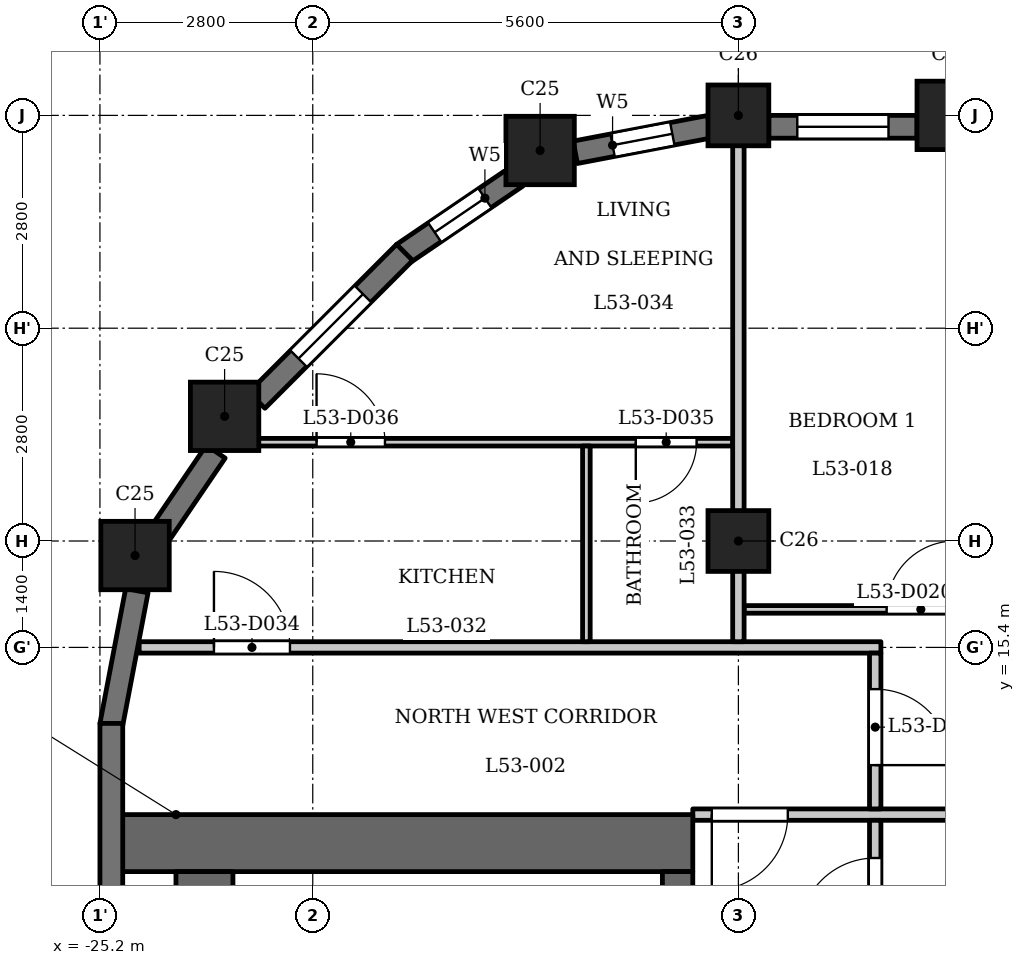
"""IFC4 building model, lengths in metres.
Left out: names, types, materials, properties, quantities, classifications, styles, units other than length and angle.
Written with IfcOpenShell. Run it as: python <this file> out.ifc"""

import sys

from ifc_helpers import new_model, si_unit, direction, frame, frame_2d, origin, origin_2d, place, context, subcontext, project, spatial, rectangle, extrude, element, fill, save


model = new_model("IFC4")
c1 = context("Model", 3, precision=1e-05, world=origin(), true_north=direction((0.0, 1.0)))
c2 = subcontext(c1, "Body", "Model", "MODEL_VIEW")
j1 = project(units=[si_unit("LENGTHUNIT", "METRE"), si_unit("PLANEANGLEUNIT", "RADIAN")], contexts=[c1])
p1 = place(None, origin())
s1 = spatial("IfcSite", under=j1, at=p1, CompositionType="ELEMENT")
p2 = place(p1, origin())
s2 = spatial("IfcBuilding", under=s1, at=p2, CompositionType="ELEMENT")
p3 = place(p2, frame((0.0, 0.0, 206.4)))
s3 = spatial("IfcBuildingStorey", under=s2, at=p3, CompositionType="ELEMENT", Elevation=206.4)
for number, where, z_axis, x_axis in (
    (1, (-14.0, 22.4, 0.0), (0.0, 0.0, 1.0), (1.0, 0.0, 0.0)),
    (2, (-19.409, 21.938, 0.0), (0.0, 0.0, 1.0), (1.0, 0.0, 0.0)),
    (3, (-23.56, 18.44, 0.0), (0.0, 0.0, 1.0), (1.0, 0.0, 0.0)),
    (4, (-24.738, 16.609, 0.0), (0.0, 0.0, 1.0), (1.0, 0.0, 0.0)),
):
    element("IfcColumn", number, at=place(p3, frame(where, z_axis=z_axis, x_axis=x_axis)), inside=s3, PredefinedType="COLUMN", context=c2, shape_type="SweptSolid", body=[
        extrude(rectangle(XDim=0.9, YDim=0.9, at=origin_2d()), origin(), (0.0, 0.0, 1.0), 3.5),
    ])
for number, where, z_axis, x_axis in (
    (5, (-16.8, 16.8, 0.0), (0.0, 0.0, 1.0), (1.0, 0.0, 0.0)),
    (6, (-16.8, 22.4, 0.0), (0.0, 0.0, 1.0), (1.0, 0.0, 0.0)),
):
    element("IfcColumn", number, at=place(p3, frame(where, z_axis=z_axis, x_axis=x_axis)), inside=s3, PredefinedType="COLUMN", context=c2, shape_type="SweptSolid", body=[
        extrude(rectangle(XDim=0.8, YDim=0.8, at=origin_2d()), origin(), (0.0, 0.0, 1.0), 3.5),
    ])
p4 = place(p3, frame((-14.45, 22.25, 0.0), z_axis=(0.0, 0.0, 1.0), x_axis=(-1.0, 0.0, 0.0)))
e7 = element("IfcWall", 7, at=p4, inside=s3, PredefinedType="SOLIDWALL", context=c2, shape_type="SweptSolid", body=[
    extrude(rectangle(XDim=1.95, YDim=0.3, at=frame_2d((0.975, 0.0))), origin(), (0.0, 0.0, 1.0), 2.5),
])
p5 = place(p4, frame((0.375, 0.0, 0.6)))
e8 = element("IfcOpeningElement", 8, at=p5, cuts=e7, PredefinedType="OPENING", context=c2, shape_type="SweptSolid", body=[
    extrude(rectangle(XDim=1.2, YDim=1.55, at=frame_2d((0.6, 0.775))), frame((0.0, 0.16, 0.0), z_axis=(0.0, -1.0, 0.0), x_axis=(1.0, 0.0, 0.0)), (0.0, 0.0, 1.0), 0.32),
])
p6 = place(p3, frame((-17.179, 22.251, 0.0), z_axis=(0.0, 0.0, 1.0), x_axis=(-0.98230529033, -0.187286722942, 0.0)))
e9 = element("IfcWall", 9, at=p6, inside=s3, PredefinedType="SOLIDWALL", context=c2, shape_type="SweptSolid", body=[
    extrude(rectangle(XDim=1.799, YDim=0.3, at=frame_2d((0.899, 0.0))), origin(), (0.0, 0.0, 1.0), 2.5),
])
p7 = place(p6, frame((0.5, 0.0, 0.6)))
e10 = element("IfcOpeningElement", 10, at=p7, cuts=e9, PredefinedType="OPENING", context=c2, shape_type="SweptSolid", body=[
    extrude(rectangle(XDim=0.8, YDim=1.55, at=frame_2d((0.4, 0.775))), frame((0.0, 0.16, 0.0), z_axis=(0.0, -1.0, 0.0), x_axis=(1.0, 0.0, 0.0)), (0.0, 0.0, 1.0), 0.32),
])
p8 = place(p3, frame((-19.719, 21.594, 0.0), z_axis=(0.0, 0.0, 1.0), x_axis=(-0.827067282455, -0.562102935673, 0.0)))
e11 = element("IfcWall", 11, at=p8, inside=s3, PredefinedType="SOLIDWALL", context=c2, shape_type="SweptSolid", body=[
    extrude(rectangle(XDim=1.806, YDim=0.3, at=frame_2d((0.903, 0.0))), origin(), (0.0, 0.0, 1.0), 2.5),
])
p9 = place(p8, frame((0.503, 0.0, 0.6)))
e12 = element("IfcOpeningElement", 12, at=p9, cuts=e11, PredefinedType="OPENING", context=c2, shape_type="SweptSolid", body=[
    extrude(rectangle(XDim=0.8, YDim=1.55, at=frame_2d((0.4, 0.775))), frame((0.0, 0.16, 0.0), z_axis=(0.0, -1.0, 0.0), x_axis=(1.0, 0.0, 0.0)), (0.0, 0.0, 1.0), 0.32),
])
p10 = place(p3, frame((-21.191, 20.597, 0.0), z_axis=(0.0, 0.0, 1.0), x_axis=(-0.707106781187, -0.707106781187, 0.0)))
e13 = element("IfcWall", 13, at=p10, inside=s3, PredefinedType="SOLIDWALL", context=c2, shape_type="SweptSolid", body=[
    extrude(rectangle(XDim=2.75, YDim=0.3, at=frame_2d((1.375, 0.0))), origin(), (0.0, 0.0, 1.0), 2.5),
])
p11 = place(p10, frame((0.775, 0.0, 0.6)))
e14 = element("IfcOpeningElement", 14, at=p11, cuts=e13, PredefinedType="OPENING", context=c2, shape_type="SweptSolid", body=[
    extrude(rectangle(XDim=1.2, YDim=1.55, at=frame_2d((0.6, 0.775))), frame((0.0, 0.16, 0.0), z_axis=(0.0, -1.0, 0.0), x_axis=(1.0, 0.0, 0.0)), (0.0, 0.0, 1.0), 0.32),
])
p12 = place(p3, frame((-23.676, 17.975, 0.0), z_axis=(0.0, 0.0, 1.0), x_axis=(-0.56200149592, -0.827136215253, 0.0)))
e15 = element("IfcWall", 15, at=p12, inside=s3, PredefinedType="SOLIDWALL", context=c2, shape_type="SweptSolid", body=[
    extrude(rectangle(XDim=1.277, YDim=0.3, at=frame_2d((0.639, 0.0))), origin(), (0.0, 0.0, 1.0), 2.5),
])
p13 = place(p3, frame((-24.714, 16.146, 0.0), z_axis=(0.0, 0.0, 1.0), x_axis=(-0.187348135549, -0.982293579388, 0.0)))
e16 = element("IfcWall", 16, at=p13, inside=s3, PredefinedType="SOLIDWALL", context=c2, shape_type="SweptSolid", body=[
    extrude(rectangle(XDim=1.806, YDim=0.3, at=frame_2d((0.903, 0.0))), origin(), (0.0, 0.0, 1.0), 2.5),
])
p14 = place(p3, frame((-25.05, 14.4, 0.0), z_axis=(0.0, 0.0, 1.0), x_axis=(0.0, -1.0, 0.0)))
e17 = element("IfcWall", 17, at=p14, inside=s3, PredefinedType="SOLIDWALL", context=c2, shape_type="SweptSolid", body=[
    extrude(rectangle(XDim=2.75, YDim=0.3, at=frame_2d((1.375, 0.0))), origin(), (0.0, 0.0, 1.0), 2.5),
])
p15 = place(p3, frame((-17.4, 12.825, 0.0), z_axis=(0.0, 0.0, 1.0), x_axis=(-1.0, 0.0, 0.0)))
e18 = element("IfcWall", 18, at=p15, inside=s3, PredefinedType="SHEAR", context=c2, shape_type="SweptSolid", body=[
    extrude(rectangle(XDim=7.6, YDim=0.75, at=frame_2d((3.8, 0.0))), origin(), (0.0, 0.0, 1.0), 3.2),
])
p16 = place(p3, frame((-17.6, -12.45, 0.0), z_axis=(0.0, 0.0, 1.0), x_axis=(0.0, 1.0, 0.0)))
e19 = element("IfcWall", 19, at=p16, inside=s3, PredefinedType="SHEAR", context=c2, shape_type="SweptSolid", body=[
    extrude(rectangle(XDim=24.9, YDim=0.4, at=frame_2d((12.45, 0.0))), origin(), (0.0, 0.0, 1.0), 3.2),
])
p17 = place(p16, frame((8.65, 0.0, 0.0)))
e20 = element("IfcOpeningElement", 20, at=p17, cuts=e19, PredefinedType="OPENING", context=c2, shape_type="SweptSolid", body=[
    extrude(rectangle(XDim=0.9, YDim=2.1, at=frame_2d((0.45, 1.05))), frame((0.0, 0.21, 0.0), z_axis=(0.0, -1.0, 0.0), x_axis=(1.0, 0.0, 0.0)), (0.0, 0.0, 1.0), 0.42),
])
p18 = place(p16, frame((15.6, 0.0, 0.0)))
e21 = element("IfcOpeningElement", 21, at=p18, cuts=e19, PredefinedType="OPENING", context=c2, shape_type="SweptSolid", body=[
    extrude(rectangle(XDim=1.1, YDim=2.1, at=frame_2d((0.55, 1.05))), frame((0.0, 0.21, 0.0), z_axis=(0.0, -1.0, 0.0), x_axis=(1.0, 0.0, 0.0)), (0.0, 0.0, 1.0), 0.42),
])
p19 = place(p16, frame((18.0, 0.0, 0.0)))
e22 = element("IfcOpeningElement", 22, at=p19, cuts=e19, PredefinedType="OPENING", context=c2, shape_type="SweptSolid", body=[
    extrude(rectangle(XDim=1.1, YDim=2.1, at=frame_2d((0.55, 1.05))), frame((0.0, 0.21, 0.0), z_axis=(0.0, -1.0, 0.0), x_axis=(1.0, 0.0, 0.0)), (0.0, 0.0, 1.0), 0.42),
])
p20 = place(p16, frame((23.025, 0.0, 0.0)))
e23 = element("IfcOpeningElement", 23, at=p20, cuts=e19, PredefinedType="OPENING", context=c2, shape_type="SweptSolid", body=[
    extrude(rectangle(XDim=1.1, YDim=2.1, at=frame_2d((0.55, 1.05))), frame((0.0, 0.21, 0.0), z_axis=(0.0, -1.0, 0.0), x_axis=(1.0, 0.0, 0.0)), (0.0, 0.0, 1.0), 0.42),
])
p21 = place(p16, frame((0.775, 0.0, 0.0)))
e24 = element("IfcOpeningElement", 24, at=p21, cuts=e19, PredefinedType="OPENING", context=c2, shape_type="SweptSolid", body=[
    extrude(rectangle(XDim=1.1, YDim=2.1, at=frame_2d((0.55, 1.05))), frame((0.0, 0.21, 0.0), z_axis=(0.0, -1.0, 0.0), x_axis=(1.0, 0.0, 0.0)), (0.0, 0.0, 1.0), 0.42),
])
p22 = place(p16, frame((12.925, 0.0, 0.0)))
e25 = element("IfcOpeningElement", 25, at=p22, cuts=e19, PredefinedType="OPENING", context=c2, shape_type="SweptSolid", body=[
    extrude(rectangle(XDim=1.8, YDim=2.1, at=frame_2d((0.9, 1.05))), frame((0.0, 0.21, 0.0), z_axis=(0.0, -1.0, 0.0), x_axis=(1.0, 0.0, 0.0)), (0.0, 0.0, 1.0), 0.42),
])
p23 = place(p3, frame((-23.825, -12.45, 0.0), z_axis=(0.0, 0.0, 1.0), x_axis=(0.0, 1.0, 0.0)))
e26 = element("IfcWall", 26, at=p23, inside=s3, PredefinedType="SHEAR", context=c2, shape_type="SweptSolid", body=[
    extrude(rectangle(XDim=24.9, YDim=0.75, at=frame_2d((12.45, 0.0))), origin(), (0.0, 0.0, 1.0), 3.2),
])
p24 = place(p3, frame((-17.4, 13.2, 0.0), z_axis=(0.0, 0.0, 1.0), x_axis=(1.0, 0.0, 0.0)))
e27 = element("IfcWall", 27, at=p24, inside=s3, PredefinedType="PARTITIONING", context=c2, shape_type="SweptSolid", body=[
    extrude(rectangle(XDim=34.8, YDim=0.15, at=frame_2d((17.4, 0.0))), origin(), (0.0, 0.0, 1.0), 3.2),
])
p25 = place(p24, frame((0.25, 0.0, 0.0)))
e28 = element("IfcOpeningElement", 28, at=p25, cuts=e27, PredefinedType="OPENING", context=c2, shape_type="SweptSolid", body=[
    extrude(rectangle(XDim=1.0, YDim=2.1, at=frame_2d((0.5, 1.05))), frame((0.0, 0.085, 0.0), z_axis=(0.0, -1.0, 0.0), x_axis=(1.0, 0.0, 0.0)), (0.0, 0.0, 1.0), 0.17),
])
p26 = place(p24, frame((33.65, 0.0, 0.0)))
e29 = element("IfcOpeningElement", 29, at=p26, cuts=e27, PredefinedType="OPENING", context=c2, shape_type="SweptSolid", body=[
    extrude(rectangle(XDim=1.0, YDim=2.1, at=frame_2d((0.5, 1.05))), frame((0.0, 0.085, 0.0), z_axis=(0.0, -1.0, 0.0), x_axis=(1.0, 0.0, 0.0)), (0.0, 0.0, 1.0), 0.17),
])
p27 = place(p3, frame((-24.684, 15.4, 0.0), z_axis=(0.0, 0.0, 1.0), x_axis=(1.0, 0.0, 0.0)))
e30 = element("IfcWall", 30, at=p27, inside=s3, PredefinedType="PARTITIONING", context=c2, shape_type="SweptSolid", body=[
    extrude(rectangle(XDim=9.759, YDim=0.15, at=frame_2d((4.879, 0.0))), origin(), (0.0, 0.0, 1.0), 3.2),
])
p28 = place(p27, frame((0.984, 0.0, 0.0)))
e31 = element("IfcOpeningElement", 31, at=p28, cuts=e30, PredefinedType="OPENING", context=c2, shape_type="SweptSolid", body=[
    extrude(rectangle(XDim=1.0, YDim=2.1, at=frame_2d((0.5, 1.05))), frame((0.0, 0.085, 0.0), z_axis=(0.0, -1.0, 0.0), x_axis=(1.0, 0.0, 0.0)), (0.0, 0.0, 1.0), 0.17),
])
p29 = place(p3, frame((-16.725, 15.9, 0.0), z_axis=(0.0, 0.0, 1.0), x_axis=(1.0, 0.0, 0.0)))
e32 = element("IfcWall", 32, at=p29, inside=s3, PredefinedType="PARTITIONING", context=c2, shape_type="SweptSolid", body=[
    extrude(rectangle(XDim=33.45, YDim=0.1, at=frame_2d((16.725, 0.0))), origin(), (0.0, 0.0, 1.0), 3.2),
])
p30 = place(p29, frame((1.875, 0.0, 0.0)))
e33 = element("IfcOpeningElement", 33, at=p30, cuts=e32, PredefinedType="OPENING", context=c2, shape_type="SweptSolid", body=[
    extrude(rectangle(XDim=0.9, YDim=2.1, at=frame_2d((0.45, 1.05))), frame((0.0, 0.06, 0.0), z_axis=(0.0, -1.0, 0.0), x_axis=(1.0, 0.0, 0.0)), (0.0, 0.0, 1.0), 0.12),
])
p31 = place(p29, frame((3.975, 0.0, 0.0)))
e34 = element("IfcOpeningElement", 34, at=p31, cuts=e32, PredefinedType="OPENING", context=c2, shape_type="SweptSolid", body=[
    extrude(rectangle(XDim=0.9, YDim=2.1, at=frame_2d((0.45, 1.05))), frame((0.0, 0.06, 0.0), z_axis=(0.0, -1.0, 0.0), x_axis=(1.0, 0.0, 0.0)), (0.0, 0.0, 1.0), 0.12),
])
p32 = place(p29, frame((6.825, 0.0, 0.0)))
e35 = element("IfcOpeningElement", 35, at=p32, cuts=e32, PredefinedType="OPENING", context=c2, shape_type="SweptSolid", body=[
    extrude(rectangle(XDim=0.9, YDim=2.1, at=frame_2d((0.45, 1.05))), frame((0.0, 0.06, 0.0), z_axis=(0.0, -1.0, 0.0), x_axis=(1.0, 0.0, 0.0)), (0.0, 0.0, 1.0), 0.12),
])
p33 = place(p29, frame((28.975, 0.0, 0.0)))
e36 = element("IfcOpeningElement", 36, at=p33, cuts=e32, PredefinedType="OPENING", context=c2, shape_type="SweptSolid", body=[
    extrude(rectangle(XDim=0.9, YDim=2.1, at=frame_2d((0.45, 1.05))), frame((0.0, 0.06, 0.0), z_axis=(0.0, -1.0, 0.0), x_axis=(1.0, 0.0, 0.0)), (0.0, 0.0, 1.0), 0.12),
])
p34 = place(p29, frame((30.725, 0.0, 0.0)))
e37 = element("IfcOpeningElement", 37, at=p34, cuts=e32, PredefinedType="OPENING", context=c2, shape_type="SweptSolid", body=[
    extrude(rectangle(XDim=0.9, YDim=2.1, at=frame_2d((0.45, 1.05))), frame((0.0, 0.06, 0.0), z_axis=(0.0, -1.0, 0.0), x_axis=(1.0, 0.0, 0.0)), (0.0, 0.0, 1.0), 0.12),
])
p35 = place(p29, frame((25.625, 0.0, 0.0)))
e38 = element("IfcOpeningElement", 38, at=p35, cuts=e32, PredefinedType="OPENING", context=c2, shape_type="SweptSolid", body=[
    extrude(rectangle(XDim=0.9, YDim=2.1, at=frame_2d((0.45, 1.05))), frame((0.0, 0.06, 0.0), z_axis=(0.0, -1.0, 0.0), x_axis=(1.0, 0.0, 0.0)), (0.0, 0.0, 1.0), 0.12),
])
p36 = place(p3, frame((-23.64, 18.1, 0.0), z_axis=(0.0, 0.0, 1.0), x_axis=(1.0, 0.0, 0.0)))
e39 = element("IfcWall", 39, at=p36, inside=s3, PredefinedType="PARTITIONING", context=c2, shape_type="SweptSolid", body=[
    extrude(rectangle(XDim=6.765, YDim=0.1, at=frame_2d((3.382, 0.0))), origin(), (0.0, 0.0, 1.0), 3.2),
])
p37 = place(p36, frame((5.49, 0.0, 0.0)))
e40 = element("IfcOpeningElement", 40, at=p37, cuts=e39, PredefinedType="OPENING", context=c2, shape_type="SweptSolid", body=[
    extrude(rectangle(XDim=0.8, YDim=2.1, at=frame_2d((0.4, 1.05))), frame((0.0, 0.06, 0.0), z_axis=(0.0, -1.0, 0.0), x_axis=(1.0, 0.0, 0.0)), (0.0, 0.0, 1.0), 0.12),
])
p38 = place(p36, frame((1.29, 0.0, 0.0)))
e41 = element("IfcOpeningElement", 41, at=p38, cuts=e39, PredefinedType="OPENING", context=c2, shape_type="SweptSolid", body=[
    extrude(rectangle(XDim=0.9, YDim=2.1, at=frame_2d((0.45, 1.05))), frame((0.0, 0.06, 0.0), z_axis=(0.0, -1.0, 0.0), x_axis=(1.0, 0.0, 0.0)), (0.0, 0.0, 1.0), 0.12),
])
p39 = place(p3, frame((-18.8, 15.475, 0.0), z_axis=(0.0, 0.0, 1.0), x_axis=(0.0, 1.0, 0.0)))
e42 = element("IfcWall", 42, at=p39, inside=s3, PredefinedType="PARTITIONING", context=c2, shape_type="SweptSolid", body=[
    extrude(rectangle(XDim=2.575, YDim=0.1, at=frame_2d((1.288, 0.0))), origin(), (0.0, 0.0, 1.0), 3.2),
])
p40 = place(p3, frame((-16.8, 15.475, 0.0), z_axis=(0.0, 0.0, 1.0), x_axis=(0.0, 1.0, 0.0)))
e43 = element("IfcWall", 43, at=p40, inside=s3, PredefinedType="PARTITIONING", context=c2, shape_type="SweptSolid", body=[
    extrude(rectangle(XDim=6.835, YDim=0.15, at=frame_2d((3.417, 0.0))), origin(), (0.0, 0.0, 1.0), 2.55),
])
p41 = place(p3, frame((-15.0, 6.769, 0.0), z_axis=(0.0, 0.0, 1.0), x_axis=(0.0, 1.0, 0.0)))
e44 = element("IfcWall", 44, at=p41, inside=s3, PredefinedType="PARTITIONING", context=c2, shape_type="SweptSolid", body=[
    extrude(rectangle(XDim=6.356, YDim=0.15, at=frame_2d((3.178, 0.0))), origin(), (0.0, 0.0, 1.0), 3.2),
])
p42 = place(p41, frame((4.86, 0.0, 0.0)))
e45 = element("IfcOpeningElement", 45, at=p42, cuts=e44, PredefinedType="OPENING", context=c2, shape_type="SweptSolid", body=[
    extrude(rectangle(XDim=1.0, YDim=2.1, at=frame_2d((0.5, 1.05))), frame((0.0, 0.085, 0.0), z_axis=(0.0, -1.0, 0.0), x_axis=(1.0, 0.0, 0.0)), (0.0, 0.0, 1.0), 0.17),
])
p43 = place(p3, frame((-15.0, 13.275, 0.0), z_axis=(0.0, 0.0, 1.0), x_axis=(0.0, 1.0, 0.0)))
e46 = element("IfcWall", 46, at=p43, inside=s3, PredefinedType="PARTITIONING", context=c2, shape_type="SweptSolid", body=[
    extrude(rectangle(XDim=2.05, YDim=0.15, at=frame_2d((1.025, 0.0))), origin(), (0.0, 0.0, 1.0), 3.2),
])
p44 = place(p43, frame((0.576, 0.0, 0.0)))
e47 = element("IfcOpeningElement", 47, at=p44, cuts=e46, PredefinedType="OPENING", context=c2, shape_type="SweptSolid", body=[
    extrude(rectangle(XDim=1.0, YDim=2.1, at=frame_2d((0.5, 1.05))), frame((0.0, 0.085, 0.0), z_axis=(0.0, -1.0, 0.0), x_axis=(1.0, 0.0, 0.0)), (0.0, 0.0, 1.0), 0.17),
])
p45 = place(p42, origin())
e48 = element("IfcDoor", 48, at=p45, inside=s3, OperationType="SINGLE_SWING_RIGHT", PredefinedType="DOOR", context=c2, shape_type="SweptSolid", body=[
    extrude(rectangle(XDim=1.0, YDim=2.1, at=frame_2d((0.5, 1.05))), frame((0.0, 0.025, 0.0), z_axis=(0.0, -1.0, 0.0), x_axis=(1.0, 0.0, 0.0)), (0.0, 0.0, 1.0), 0.05),
])
fill(e45, e48)
p46 = place(p25, origin())
e49 = element("IfcDoor", 49, at=p46, inside=s3, OperationType="SINGLE_SWING_LEFT", PredefinedType="DOOR", context=c2, shape_type="SweptSolid", body=[
    extrude(rectangle(XDim=1.0, YDim=2.1, at=frame_2d((0.5, 1.05))), frame((0.0, 0.025, 0.0), z_axis=(0.0, -1.0, 0.0), x_axis=(1.0, 0.0, 0.0)), (0.0, 0.0, 1.0), 0.05),
])
fill(e28, e49)
p47 = place(p44, origin())
e50 = element("IfcDoor", 50, at=p47, inside=s3, OperationType="SINGLE_SWING_LEFT", PredefinedType="DOOR", context=c2, shape_type="SweptSolid", body=[
    extrude(rectangle(XDim=1.0, YDim=2.1, at=frame_2d((0.5, 1.05))), frame((0.0, 0.025, 0.0), z_axis=(0.0, -1.0, 0.0), x_axis=(1.0, 0.0, 0.0)), (0.0, 0.0, 1.0), 0.05),
])
fill(e47, e50)
p48 = place(p30, origin())
e51 = element("IfcDoor", 51, at=p48, inside=s3, OperationType="SINGLE_SWING_LEFT", PredefinedType="DOOR", context=c2, shape_type="SweptSolid", body=[
    extrude(rectangle(XDim=0.9, YDim=2.1, at=frame_2d((0.45, 1.05))), frame((0.0, 0.025, 0.0), z_axis=(0.0, -1.0, 0.0), x_axis=(1.0, 0.0, 0.0)), (0.0, 0.0, 1.0), 0.05),
])
fill(e33, e51)
p49 = place(p28, origin())
e52 = element("IfcDoor", 52, at=p49, inside=s3, OperationType="SINGLE_SWING_RIGHT", PredefinedType="DOOR", context=c2, shape_type="SweptSolid", body=[
    extrude(rectangle(XDim=1.0, YDim=2.1, at=frame_2d((0.5, 1.05))), frame((0.0, 0.025, 0.0), z_axis=(0.0, -1.0, 0.0), x_axis=(1.0, 0.0, 0.0)), (0.0, 0.0, 1.0), 0.05),
])
fill(e31, e52)
p50 = place(p37, origin())
e53 = element("IfcDoor", 53, at=p50, inside=s3, OperationType="SINGLE_SWING_LEFT", PredefinedType="DOOR", context=c2, shape_type="SweptSolid", body=[
    extrude(rectangle(XDim=0.8, YDim=2.1, at=frame_2d((0.4, 1.05))), frame((0.0, 0.025, 0.0), z_axis=(0.0, -1.0, 0.0), x_axis=(1.0, 0.0, 0.0)), (0.0, 0.0, 1.0), 0.05),
])
fill(e40, e53)
p51 = place(p38, origin())
e54 = element("IfcDoor", 54, at=p51, inside=s3, OperationType="SINGLE_SWING_RIGHT", PredefinedType="DOOR", context=c2, shape_type="SweptSolid", body=[
    extrude(rectangle(XDim=0.9, YDim=2.1, at=frame_2d((0.45, 1.05))), frame((0.0, 0.025, 0.0), z_axis=(0.0, -1.0, 0.0), x_axis=(1.0, 0.0, 0.0)), (0.0, 0.0, 1.0), 0.05),
])
fill(e41, e54)
p52 = place(p5, origin())
e55 = element("IfcWindow", 55, at=p52, inside=s3, PartitioningType="SINGLE_PANEL", PredefinedType="WINDOW", context=c2, shape_type="SweptSolid", body=[
    extrude(rectangle(XDim=1.2, YDim=1.55, at=frame_2d((0.6, 0.775))), frame((0.0, 0.03, 0.0), z_axis=(0.0, -1.0, 0.0), x_axis=(1.0, 0.0, 0.0)), (0.0, 0.0, 1.0), 0.06),
])
fill(e8, e55)
p53 = place(p7, origin())
e56 = element("IfcWindow", 56, at=p53, inside=s3, PartitioningType="SINGLE_PANEL", PredefinedType="WINDOW", context=c2, shape_type="SweptSolid", body=[
    extrude(rectangle(XDim=0.8, YDim=1.55, at=frame_2d((0.4, 0.775))), frame((0.0, 0.03, 0.0), z_axis=(0.0, -1.0, 0.0), x_axis=(1.0, 0.0, 0.0)), (0.0, 0.0, 1.0), 0.06),
])
fill(e10, e56)
p54 = place(p9, origin())
e57 = element("IfcWindow", 57, at=p54, inside=s3, PartitioningType="SINGLE_PANEL", PredefinedType="WINDOW", context=c2, shape_type="SweptSolid", body=[
    extrude(rectangle(XDim=0.8, YDim=1.55, at=frame_2d((0.4, 0.775))), frame((0.0, 0.03, 0.0), z_axis=(0.0, -1.0, 0.0), x_axis=(1.0, 0.0, 0.0)), (0.0, 0.0, 1.0), 0.06),
])
fill(e12, e57)
p55 = place(p11, origin())
e58 = element("IfcWindow", 58, at=p55, inside=s3, PartitioningType="SINGLE_PANEL", PredefinedType="WINDOW", context=c2, shape_type="SweptSolid", body=[
    extrude(rectangle(XDim=1.2, YDim=1.55, at=frame_2d((0.6, 0.775))), frame((0.0, 0.03, 0.0), z_axis=(0.0, -1.0, 0.0), x_axis=(1.0, 0.0, 0.0)), (0.0, 0.0, 1.0), 0.06),
])
fill(e14, e58)
save(model, sys.argv[1])
